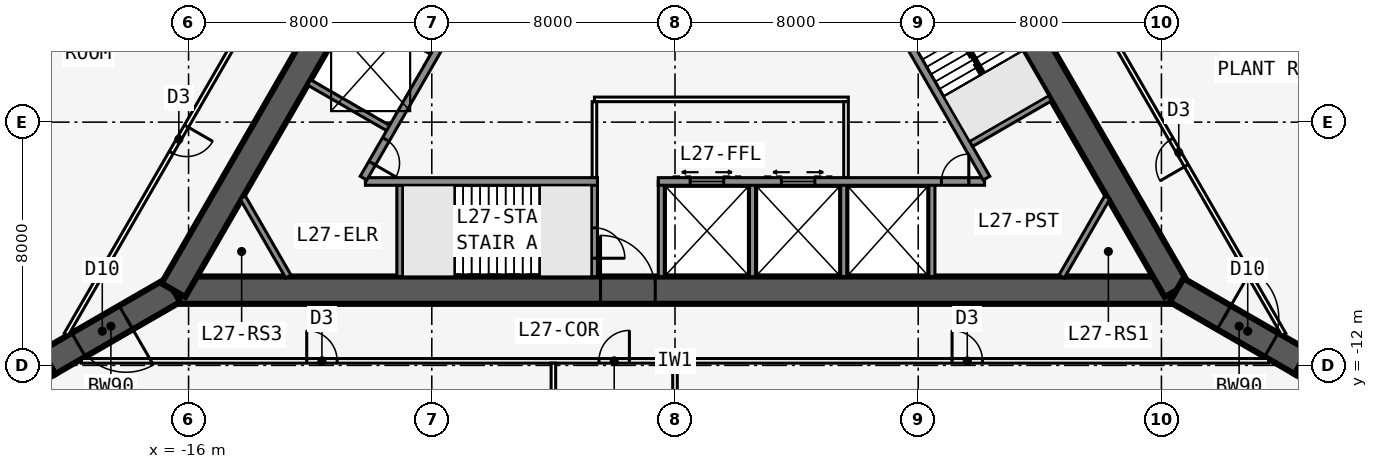
"""IFC4 building model, lengths in metres.
Left out: names, types, materials, properties, quantities, classifications, styles, units other than length and angle.
Written with IfcOpenShell. Run it as: python <this file> out.ifc"""

import sys

from ifc_helpers import new_model, si_unit, direction, frame, frame_2d, origin, place, context, subcontext, project, spatial, rectangle, extrude, element, fill, save


model = new_model("IFC4")
c1 = context("Model", 3, precision=1e-05, world=origin(), true_north=direction((0.0, 1.0)))
c2 = subcontext(c1, "Body", "Model", "MODEL_VIEW")
j1 = project(units=[si_unit("LENGTHUNIT", "METRE"), si_unit("PLANEANGLEUNIT", "RADIAN")], contexts=[c1])
p1 = place(None, origin())
s1 = spatial("IfcSite", under=j1, at=p1, CompositionType="ELEMENT")
p2 = place(p1, origin())
s2 = spatial("IfcBuilding", under=s1, at=p2, CompositionType="ELEMENT")
p3 = place(p2, frame((0.0, 0.0, 103.3)))
s3 = spatial("IfcBuildingStorey", under=s2, at=p3, CompositionType="ELEMENT", Elevation=103.3)
p4 = place(p3, frame((-16.5, -9.526, 0.0), z_axis=(0.0, 0.0, 1.0), x_axis=(1.0, 0.0, 0.0)))
e1 = element("IfcWall", 1, at=p4, inside=s3, PredefinedType="SHEAR", context=c2, shape_type="SweptSolid", body=[
    extrude(rectangle(XDim=33.0, YDim=0.9, at=frame_2d((16.5, 0.0))), origin(), (0.0, 0.0, 1.0), 6.4),
])
p5 = place(p4, frame((14.05, 0.0, 0.0)))
e2 = element("IfcOpeningElement", 2, at=p5, cuts=e1, PredefinedType="OPENING", context=c2, shape_type="SweptSolid", body=[
    extrude(rectangle(XDim=1.8, YDim=2.13, at=frame_2d((0.9, 1.065))), frame((0.0, 0.46, 0.0), z_axis=(0.0, -1.0, 0.0), x_axis=(1.0, 0.0, 0.0)), (0.0, 0.0, 1.0), 0.92),
])
p6 = place(p3, frame((-10.183, -5.951, 0.0), z_axis=(0.0, 0.0, 1.0), x_axis=(1.0, 0.0, 0.0)))
e3 = element("IfcWall", 3, at=p6, inside=s3, PredefinedType="SOLIDWALL", context=c2, shape_type="SweptSolid", body=[
    extrude(rectangle(XDim=7.633, YDim=0.25, at=frame_2d((3.816, 0.0))), origin(), (0.0, 0.0, 1.0), 6.15),
])
p7 = place(p3, frame((-0.55, -5.951, 0.0), z_axis=(0.0, 0.0, 1.0), x_axis=(1.0, 0.0, 0.0)))
e4 = element("IfcWall", 4, at=p7, inside=s3, PredefinedType="SOLIDWALL", context=c2, shape_type="SweptSolid", body=[
    extrude(rectangle(XDim=10.733, YDim=0.25, at=frame_2d((5.366, 0.0))), origin(), (0.0, 0.0, 1.0), 6.15),
])
p8 = place(p7, frame((9.314, 0.0, 0.0)))
e5 = element("IfcOpeningElement", 5, at=p8, cuts=e4, PredefinedType="OPENING", context=c2, shape_type="SweptSolid", body=[
    extrude(rectangle(XDim=0.9, YDim=2.13, at=frame_2d((0.45, 1.065))), frame((0.0, 0.135, 0.0), z_axis=(0.0, -1.0, 0.0), x_axis=(1.0, 0.0, 0.0)), (0.0, 0.0, 1.0), 0.27),
])
p9 = place(p7, frame((1.05, 0.0, 0.0)))
e6 = element("IfcOpeningElement", 6, at=p9, cuts=e4, PredefinedType="OPENING", context=c2, shape_type="SweptSolid", body=[
    extrude(rectangle(XDim=1.1, YDim=2.13, at=frame_2d((0.55, 1.065))), frame((0.0, 0.135, 0.0), z_axis=(0.0, -1.0, 0.0), x_axis=(1.0, 0.0, 0.0)), (0.0, 0.0, 1.0), 0.27),
])
p10 = place(p7, frame((4.05, 0.0, 0.0)))
e7 = element("IfcOpeningElement", 7, at=p10, cuts=e4, PredefinedType="OPENING", context=c2, shape_type="SweptSolid", body=[
    extrude(rectangle(XDim=1.1, YDim=2.13, at=frame_2d((0.55, 1.065))), frame((0.0, 0.135, 0.0), z_axis=(0.0, -1.0, 0.0), x_axis=(1.0, 0.0, 0.0)), (0.0, 0.0, 1.0), 0.27),
])
p11 = place(p3, frame((-9.05, -5.951, 0.0), z_axis=(0.0, 0.0, 1.0), x_axis=(0.0, -1.0, 0.0)))
e8 = element("IfcWall", 8, at=p11, inside=s3, PredefinedType="SOLIDWALL", context=c2, shape_type="SweptSolid", body=[
    extrude(rectangle(XDim=3.125, YDim=0.2, at=frame_2d((1.562, 0.0))), origin(), (0.0, 0.0, 1.0), 6.15),
])
p12 = place(p3, frame((-2.65, -5.951, 0.0), z_axis=(0.0, 0.0, 1.0), x_axis=(0.0, -1.0, 0.0)))
e9 = element("IfcWall", 9, at=p12, inside=s3, PredefinedType="SOLIDWALL", context=c2, shape_type="SweptSolid", body=[
    extrude(rectangle(XDim=3.125, YDim=0.2, at=frame_2d((1.562, 0.0))), origin(), (0.0, 0.0, 1.0), 6.15),
])
p13 = place(p12, frame((1.525, 0.0, 0.0)))
e10 = element("IfcOpeningElement", 10, at=p13, cuts=e9, PredefinedType="OPENING", context=c2, shape_type="SweptSolid", body=[
    extrude(rectangle(XDim=1.0, YDim=2.13, at=frame_2d((0.5, 1.065))), frame((0.0, 0.11, 0.0), z_axis=(0.0, -1.0, 0.0), x_axis=(1.0, 0.0, 0.0)), (0.0, 0.0, 1.0), 0.22),
])
for number, where, z_axis, x_axis in (
    (11, (-0.45, -5.951, 0.0), (0.0, 0.0, 1.0), (0.0, -1.0, 0.0)),
    (12, (2.55, -5.951, 0.0), (0.0, 0.0, 1.0), (0.0, -1.0, 0.0)),
    (13, (5.55, -5.951, 0.0), (0.0, 0.0, 1.0), (0.0, -1.0, 0.0)),
    (14, (8.45, -5.951, 0.0), (0.0, 0.0, 1.0), (0.0, -1.0, 0.0)),
):
    element("IfcWall", number, at=place(p3, frame(where, z_axis=z_axis, x_axis=x_axis)), inside=s3, PredefinedType="SOLIDWALL", context=c2, shape_type="SweptSolid", body=[
        extrude(rectangle(XDim=3.125, YDim=0.2, at=frame_2d((1.562, 0.0))), origin(), (0.0, 0.0, 1.0), 6.15),
    ])
p14 = place(p3, frame((16.5, -9.526, 0.0), z_axis=(0.0, 0.0, 1.0), x_axis=(-0.499999749417, 0.866025548458, 0.0)))
e15 = element("IfcWall", 15, at=p14, inside=s3, PredefinedType="SHEAR", context=c2, shape_type="SweptSolid", body=[
    extrude(rectangle(XDim=33.0, YDim=0.9, at=frame_2d((16.5, 0.0))), origin(), (0.0, 0.0, 1.0), 6.4),
])
p15 = place(p14, frame((14.15, 0.0, 0.0)))
e16 = element("IfcOpeningElement", 16, at=p15, cuts=e15, PredefinedType="OPENING", context=c2, shape_type="SweptSolid", body=[
    extrude(rectangle(XDim=1.8, YDim=2.13, at=frame_2d((0.9, 1.065))), frame((0.0, 0.46, 0.0), z_axis=(0.0, -1.0, 0.0), x_axis=(1.0, 0.0, 0.0)), (0.0, 0.0, 1.0), 0.92),
])
p16 = place(p14, frame((12.6, 0.0, 0.0)))
e17 = element("IfcOpeningElement", 17, at=p16, cuts=e15, PredefinedType="OPENING", context=c2, shape_type="SweptSolid", body=[
    extrude(rectangle(XDim=1.0, YDim=2.13, at=frame_2d((0.5, 1.065))), frame((0.0, 0.46, 0.0), z_axis=(0.0, -1.0, 0.0), x_axis=(1.0, 0.0, 0.0)), (0.0, 0.0, 1.0), 0.92),
])
p17 = place(p3, frame((10.245, -5.843, 0.0), z_axis=(0.0, 0.0, 1.0), x_axis=(-0.499993009313, 0.866029439822, 0.0)))
e18 = element("IfcWall", 18, at=p17, inside=s3, PredefinedType="SOLIDWALL", context=c2, shape_type="SweptSolid", body=[
    extrude(rectangle(XDim=7.733, YDim=0.25, at=frame_2d((3.866, 0.0))), origin(), (0.0, 0.0, 1.0), 6.15),
])
p18 = place(p3, frame((9.629, -4.775, 0.0), z_axis=(0.0, 0.0, 1.0), x_axis=(0.866022959057, 0.500004234368, 0.0)))
e19 = element("IfcWall", 19, at=p18, inside=s3, PredefinedType="SOLIDWALL", context=c2, shape_type="SweptSolid", body=[
    extrude(rectangle(XDim=3.125, YDim=0.2, at=frame_2d((1.562, 0.0))), origin(), (0.0, 0.0, 1.0), 6.15),
])
p19 = place(p3, frame((0.0, 19.052, 0.0), z_axis=(0.0, 0.0, 1.0), x_axis=(-0.499999749417, -0.866025548458, 0.0)))
e20 = element("IfcWall", 20, at=p19, inside=s3, PredefinedType="SHEAR", context=c2, shape_type="SweptSolid", body=[
    extrude(rectangle(XDim=33.0, YDim=0.9, at=frame_2d((16.5, 0.0))), origin(), (0.0, 0.0, 1.0), 6.4),
])
p20 = place(p19, frame((14.15, 0.0, 0.0)))
e21 = element("IfcOpeningElement", 21, at=p20, cuts=e20, PredefinedType="OPENING", context=c2, shape_type="SweptSolid", body=[
    extrude(rectangle(XDim=1.8, YDim=2.13, at=frame_2d((0.9, 1.065))), frame((0.0, 0.46, 0.0), z_axis=(0.0, -1.0, 0.0), x_axis=(1.0, 0.0, 0.0)), (0.0, 0.0, 1.0), 0.92),
])
p21 = place(p19, frame((12.6, 0.0, 0.0)))
e22 = element("IfcOpeningElement", 22, at=p21, cuts=e20, PredefinedType="OPENING", context=c2, shape_type="SweptSolid", body=[
    extrude(rectangle(XDim=1.0, YDim=2.13, at=frame_2d((0.5, 1.065))), frame((0.0, 0.46, 0.0), z_axis=(0.0, -1.0, 0.0), x_axis=(1.0, 0.0, 0.0)), (0.0, 0.0, 1.0), 0.92),
])
p22 = place(p3, frame((-4.929, 3.365, 0.0), z_axis=(0.0, 0.0, 1.0), x_axis=(-0.499991433582, -0.866030349552, 0.0)))
e23 = element("IfcWall", 23, at=p22, inside=s3, PredefinedType="SOLIDWALL", context=c2, shape_type="SweptSolid", body=[
    extrude(rectangle(XDim=10.633, YDim=0.25, at=frame_2d((5.316, 0.0))), origin(), (0.0, 0.0, 1.0), 6.15),
])
p23 = place(p22, frame((9.164, 0.0, 0.0)))
e24 = element("IfcOpeningElement", 24, at=p23, cuts=e23, PredefinedType="OPENING", context=c2, shape_type="SweptSolid", body=[
    extrude(rectangle(XDim=0.9, YDim=2.13, at=frame_2d((0.45, 1.065))), frame((0.0, 0.135, 0.0), z_axis=(0.0, -1.0, 0.0), x_axis=(1.0, 0.0, 0.0)), (0.0, 0.0, 1.0), 0.27),
])
for number, where, z_axis, x_axis in (
    (25, (-7.879, -1.744, 0.0), (0.0, 0.0, 1.0), (-0.866, 0.5, 0.0)),
    (26, (-9.329, -4.256, 0.0), (0.0, 0.0, 1.0), (-0.866, 0.5, 0.0)),
):
    element("IfcWall", number, at=place(p3, frame(where, z_axis=z_axis, x_axis=x_axis)), inside=s3, PredefinedType="SOLIDWALL", context=c2, shape_type="SweptSolid", body=[
        extrude(rectangle(XDim=3.125, YDim=0.2, at=frame_2d((1.562, 0.0))), origin(), (0.0, 0.0, 1.0), 6.15),
    ])
p24 = place(p3, frame((16.5, -9.526, 0.0), z_axis=(0.0, 0.0, 1.0), x_axis=(0.866031398331, -0.499989616998, 0.0)))
e27 = element("IfcWall", 27, at=p24, inside=s3, PredefinedType="SHEAR", context=c2, shape_type="SweptSolid", body=[
    extrude(rectangle(XDim=4.746, YDim=0.9, at=frame_2d((2.373, 0.0))), origin(), (0.0, 0.0, 1.0), 6.4),
])
p25 = place(p24, frame((1.8, 0.0, 0.0)))
e28 = element("IfcOpeningElement", 28, at=p25, cuts=e27, PredefinedType="OPENING", context=c2, shape_type="SweptSolid", body=[
    extrude(rectangle(XDim=1.8, YDim=2.13, at=frame_2d((0.9, 1.065))), frame((0.0, 0.46, 0.0), z_axis=(0.0, -1.0, 0.0), x_axis=(1.0, 0.0, 0.0)), (0.0, 0.0, 1.0), 0.92),
])
p26 = place(p3, frame((20.61, -11.899, 0.0), z_axis=(0.0, 0.0, 1.0), x_axis=(0.866009537788, -0.500027479704, 0.0)))
e29 = element("IfcWall", 29, at=p26, inside=s3, PredefinedType="SHEAR", context=c2, shape_type="SweptSolid", body=[
    extrude(rectangle(XDim=1.155, YDim=0.9, at=frame_2d((0.577, 0.0))), origin(), (0.0, 0.0, 1.0), 6.4),
])
p27 = place(p3, frame((-16.5, -9.526, 0.0), z_axis=(0.0, 0.0, 1.0), x_axis=(-0.866031398331, -0.499989616998, 0.0)))
e30 = element("IfcWall", 30, at=p27, inside=s3, PredefinedType="SHEAR", context=c2, shape_type="SweptSolid", body=[
    extrude(rectangle(XDim=4.746, YDim=0.9, at=frame_2d((2.373, 0.0))), origin(), (0.0, 0.0, 1.0), 6.4),
])
p28 = place(p27, frame((1.8, 0.0, 0.0)))
e31 = element("IfcOpeningElement", 31, at=p28, cuts=e30, PredefinedType="OPENING", context=c2, shape_type="SweptSolid", body=[
    extrude(rectangle(XDim=1.8, YDim=2.13, at=frame_2d((0.9, 1.065))), frame((0.0, 0.46, 0.0), z_axis=(0.0, -1.0, 0.0), x_axis=(1.0, 0.0, 0.0)), (0.0, 0.0, 1.0), 0.92),
])
p29 = place(p3, frame((-20.61, -11.899, 0.0), z_axis=(0.0, 0.0, 1.0), x_axis=(-0.866009537788, -0.500027479704, 0.0)))
e32 = element("IfcWall", 32, at=p29, inside=s3, PredefinedType="SHEAR", context=c2, shape_type="SweptSolid", body=[
    extrude(rectangle(XDim=1.155, YDim=0.9, at=frame_2d((0.577, 0.0))), origin(), (0.0, 0.0, 1.0), 6.4),
])
p30 = place(p3, frame((-19.527, -11.851, 0.0), z_axis=(0.0, 0.0, 1.0), x_axis=(1.0, 0.0, 0.0)))
e33 = element("IfcWall", 33, at=p30, inside=s3, PredefinedType="PARTITIONING", context=c2, shape_type="SweptSolid", body=[
    extrude(rectangle(XDim=39.054, YDim=0.15, at=frame_2d((19.527, 0.0))), origin(), (0.0, 0.0, 1.0), 6.15),
])
p31 = place(p30, frame((7.414, 0.0, 0.0)))
e34 = element("IfcOpeningElement", 34, at=p31, cuts=e33, PredefinedType="OPENING", context=c2, shape_type="SweptSolid", body=[
    extrude(rectangle(XDim=1.0, YDim=2.13, at=frame_2d((0.5, 1.065))), frame((0.0, 0.085, 0.0), z_axis=(0.0, -1.0, 0.0), x_axis=(1.0, 0.0, 0.0)), (0.0, 0.0, 1.0), 0.17),
])
p32 = place(p30, frame((17.027, 0.0, 0.0)))
e35 = element("IfcOpeningElement", 35, at=p32, cuts=e33, PredefinedType="OPENING", context=c2, shape_type="SweptSolid", body=[
    extrude(rectangle(XDim=1.0, YDim=2.13, at=frame_2d((0.5, 1.065))), frame((0.0, 0.085, 0.0), z_axis=(0.0, -1.0, 0.0), x_axis=(1.0, 0.0, 0.0)), (0.0, 0.0, 1.0), 0.17),
])
p33 = place(p30, frame((28.64, 0.0, 0.0)))
e36 = element("IfcOpeningElement", 36, at=p33, cuts=e33, PredefinedType="OPENING", context=c2, shape_type="SweptSolid", body=[
    extrude(rectangle(XDim=1.0, YDim=2.13, at=frame_2d((0.5, 1.065))), frame((0.0, 0.085, 0.0), z_axis=(0.0, -1.0, 0.0), x_axis=(1.0, 0.0, 0.0)), (0.0, 0.0, 1.0), 0.17),
])
p34 = place(p3, frame((-4.0, -11.926, 0.0), z_axis=(0.0, 0.0, 1.0), x_axis=(0.0, -1.0, 0.0)))
e37 = element("IfcWall", 37, at=p34, inside=s3, PredefinedType="PARTITIONING", context=c2, shape_type="SweptSolid", body=[
    extrude(rectangle(XDim=9.974, YDim=0.15, at=frame_2d((4.987, 0.0))), origin(), (0.0, 0.0, 1.0), 6.15),
])
p35 = place(p3, frame((0.0, -11.926, 0.0), z_axis=(0.0, 0.0, 1.0), x_axis=(0.0, -1.0, 0.0)))
e38 = element("IfcWall", 38, at=p35, inside=s3, PredefinedType="PARTITIONING", context=c2, shape_type="SweptSolid", body=[
    extrude(rectangle(XDim=10.096, YDim=0.15, at=frame_2d((5.048, 0.0))), origin(), (0.0, 0.0, 1.0), 5.109),
])
p36 = place(p3, frame((20.027, -10.985, 0.0), z_axis=(0.0, 0.0, 1.0), x_axis=(-0.500001677587, 0.866024435227, 0.0)))
e39 = element("IfcWall", 39, at=p36, inside=s3, PredefinedType="PARTITIONING", context=c2, shape_type="SweptSolid", body=[
    extrude(rectangle(XDim=39.054, YDim=0.15, at=frame_2d((19.527, 0.0))), origin(), (0.0, 0.0, 1.0), 6.15),
])
p37 = place(p36, frame((6.414, 0.0, 0.0)))
e40 = element("IfcOpeningElement", 40, at=p37, cuts=e39, PredefinedType="OPENING", context=c2, shape_type="SweptSolid", body=[
    extrude(rectangle(XDim=1.0, YDim=2.13, at=frame_2d((0.5, 1.065))), frame((0.0, 0.085, 0.0), z_axis=(0.0, -1.0, 0.0), x_axis=(1.0, 0.0, 0.0)), (0.0, 0.0, 1.0), 0.17),
])
p38 = place(p36, frame((17.527, 0.0, 0.0)))
e41 = element("IfcOpeningElement", 41, at=p38, cuts=e39, PredefinedType="OPENING", context=c2, shape_type="SweptSolid", body=[
    extrude(rectangle(XDim=1.0, YDim=2.13, at=frame_2d((0.5, 1.065))), frame((0.0, 0.085, 0.0), z_axis=(0.0, -1.0, 0.0), x_axis=(1.0, 0.0, 0.0)), (0.0, 0.0, 1.0), 0.17),
])
p39 = place(p36, frame((30.14, 0.0, 0.0)))
e42 = element("IfcOpeningElement", 42, at=p39, cuts=e39, PredefinedType="OPENING", context=c2, shape_type="SweptSolid", body=[
    extrude(rectangle(XDim=1.0, YDim=2.13, at=frame_2d((0.5, 1.065))), frame((0.0, 0.085, 0.0), z_axis=(0.0, -1.0, 0.0), x_axis=(1.0, 0.0, 0.0)), (0.0, 0.0, 1.0), 0.17),
])
p40 = place(p3, frame((-0.5, 22.836, 0.0), z_axis=(0.0, 0.0, 1.0), x_axis=(-0.500001677587, -0.866024435227, 0.0)))
e43 = element("IfcWall", 43, at=p40, inside=s3, PredefinedType="PARTITIONING", context=c2, shape_type="SweptSolid", body=[
    extrude(rectangle(XDim=39.054, YDim=0.15, at=frame_2d((19.527, 0.0))), origin(), (0.0, 0.0, 1.0), 6.15),
])
p41 = place(p40, frame((9.414, 0.0, 0.0)))
e44 = element("IfcOpeningElement", 44, at=p41, cuts=e43, PredefinedType="OPENING", context=c2, shape_type="SweptSolid", body=[
    extrude(rectangle(XDim=1.0, YDim=2.13, at=frame_2d((0.5, 1.065))), frame((0.0, 0.085, 0.0), z_axis=(0.0, -1.0, 0.0), x_axis=(1.0, 0.0, 0.0)), (0.0, 0.0, 1.0), 0.17),
])
p42 = place(p40, frame((21.527, 0.0, 0.0)))
e45 = element("IfcOpeningElement", 45, at=p42, cuts=e43, PredefinedType="OPENING", context=c2, shape_type="SweptSolid", body=[
    extrude(rectangle(XDim=1.0, YDim=2.13, at=frame_2d((0.5, 1.065))), frame((0.0, 0.085, 0.0), z_axis=(0.0, -1.0, 0.0), x_axis=(1.0, 0.0, 0.0)), (0.0, 0.0, 1.0), 0.17),
])
p43 = place(p40, frame((31.14, 0.0, 0.0)))
e46 = element("IfcOpeningElement", 46, at=p43, cuts=e43, PredefinedType="OPENING", context=c2, shape_type="SweptSolid", body=[
    extrude(rectangle(XDim=1.0, YDim=2.13, at=frame_2d((0.5, 1.065))), frame((0.0, 0.085, 0.0), z_axis=(0.0, -1.0, 0.0), x_axis=(1.0, 0.0, 0.0)), (0.0, 0.0, 1.0), 0.17),
])
p44 = place(p3, frame((-2.65, -3.251, 0.0), z_axis=(0.0, 0.0, 1.0), x_axis=(1.0, 0.0, 0.0)))
e47 = element("IfcWall", 47, at=p44, inside=s3, PredefinedType="PARTITIONING", context=c2, shape_type="SweptSolid", body=[
    extrude(rectangle(XDim=8.35, YDim=0.15, at=frame_2d((4.175, 0.0))), origin(), (0.0, 0.0, 1.0), 6.15),
])
for number, where, z_axis, x_axis in (
    (48, (-2.65, -5.826, 0.0), (0.0, 0.0, 1.0), (0.0, 1.0, 0.0)),
    (49, (5.625, -5.826, 0.0), (0.0, 0.0, 1.0), (0.0, 1.0, 0.0)),
):
    element("IfcWall", number, at=place(p3, frame(where, z_axis=z_axis, x_axis=x_axis)), inside=s3, PredefinedType="PARTITIONING", context=c2, shape_type="SweptSolid", body=[
        extrude(rectangle(XDim=2.5, YDim=0.15, at=frame_2d((1.25, 0.0))), origin(), (0.0, 0.0, 1.0), 6.15),
    ])
for number, where, z_axis, x_axis in (
    (50, (14.219, -6.476, 0.0), (0.0, 0.0, 1.0), (-0.5, -0.866, 0.0)),
    (51, (-12.719, -9.076, 0.0), (0.0, 0.0, 1.0), (-0.5, 0.866, 0.0)),
):
    element("IfcWall", number, at=place(p3, frame(where, z_axis=z_axis, x_axis=x_axis)), inside=s3, PredefinedType="SOLIDWALL", context=c2, shape_type="SweptSolid", body=[
        extrude(rectangle(XDim=3.002, YDim=0.2, at=frame_2d((1.501, 0.0))), origin(), (0.0, 0.0, 1.0), 6.15),
    ])
p45 = place(p3, frame((-7.247, -7.576, 0.0), z_axis=(0.0, 0.0, 1.0), x_axis=(1.0, 0.0, 0.0)))
e52 = element("IfcWall", 52, at=p45, inside=s3, PredefinedType="SOLIDWALL", context=c2, shape_type="SweptSolid", body=[
    extrude(rectangle(XDim=2.794, YDim=0.1, at=frame_2d((1.397, 0.0))), origin(), (0.0, 0.0, 1.0), 6.4),
])
p46 = place(p3, frame((10.135, -2.401, 0.0), z_axis=(0.0, 0.0, 1.0), x_axis=(-0.499992232847, 0.866029888106, 0.0)))
e53 = element("IfcWall", 53, at=p46, inside=s3, PredefinedType="SOLIDWALL", context=c2, shape_type="SweptSolid", body=[
    extrude(rectangle(XDim=2.794, YDim=0.1, at=frame_2d((1.397, 0.0))), origin(), (0.0, 0.0, 1.0), 6.4),
])
p47 = place(p31, origin())
e54 = element("IfcDoor", 54, at=p47, inside=s3, OperationType="SINGLE_SWING_LEFT", PredefinedType="DOOR", context=c2, shape_type="SweptSolid", body=[
    extrude(rectangle(XDim=1.0, YDim=2.13, at=frame_2d((0.5, 1.065))), frame((0.0, 0.025, 0.0), z_axis=(0.0, -1.0, 0.0), x_axis=(1.0, 0.0, 0.0)), (0.0, 0.0, 1.0), 0.05),
])
fill(e34, e54)
p48 = place(p32, origin())
e55 = element("IfcDoor", 55, at=p48, inside=s3, OperationType="SINGLE_SWING_RIGHT", PredefinedType="DOOR", context=c2, shape_type="SweptSolid", body=[
    extrude(rectangle(XDim=1.0, YDim=2.13, at=frame_2d((0.5, 1.065))), frame((0.0, 0.025, 0.0), z_axis=(0.0, -1.0, 0.0), x_axis=(1.0, 0.0, 0.0)), (0.0, 0.0, 1.0), 0.05),
])
fill(e35, e55)
p49 = place(p33, origin())
e56 = element("IfcDoor", 56, at=p49, inside=s3, OperationType="SINGLE_SWING_LEFT", PredefinedType="DOOR", context=c2, shape_type="SweptSolid", body=[
    extrude(rectangle(XDim=1.0, YDim=2.13, at=frame_2d((0.5, 1.065))), frame((0.0, 0.025, 0.0), z_axis=(0.0, -1.0, 0.0), x_axis=(1.0, 0.0, 0.0)), (0.0, 0.0, 1.0), 0.05),
])
fill(e36, e56)
p50 = place(p37, origin())
e57 = element("IfcDoor", 57, at=p50, inside=s3, OperationType="SINGLE_SWING_LEFT", PredefinedType="DOOR", context=c2, shape_type="SweptSolid", body=[
    extrude(rectangle(XDim=1.0, YDim=2.13, at=frame_2d((0.5, 1.065))), frame((0.0, 0.025, 0.0), z_axis=(0.0, -1.0, 0.0), x_axis=(1.0, 0.0, 0.0)), (0.0, 0.0, 1.0), 0.05),
])
fill(e40, e57)
p51 = place(p43, origin())
e58 = element("IfcDoor", 58, at=p51, inside=s3, OperationType="SINGLE_SWING_LEFT", PredefinedType="DOOR", context=c2, shape_type="SweptSolid", body=[
    extrude(rectangle(XDim=1.0, YDim=2.13, at=frame_2d((0.5, 1.065))), frame((0.0, 0.025, 0.0), z_axis=(0.0, -1.0, 0.0), x_axis=(1.0, 0.0, 0.0)), (0.0, 0.0, 1.0), 0.05),
])
fill(e46, e58)
p52 = place(p5, origin())
e59 = element("IfcDoor", 59, at=p52, inside=s3, OperationType="DOUBLE_DOOR_SINGLE_SWING", PredefinedType="DOOR", context=c2, shape_type="SweptSolid", body=[
    extrude(rectangle(XDim=1.8, YDim=2.13, at=frame_2d((0.9, 1.065))), frame((0.0, 0.025, 0.0), z_axis=(0.0, -1.0, 0.0), x_axis=(1.0, 0.0, 0.0)), (0.0, 0.0, 1.0), 0.05),
])
fill(e2, e59)
p53 = place(p13, origin())
e60 = element("IfcDoor", 60, at=p53, inside=s3, OperationType="SINGLE_SWING_RIGHT", PredefinedType="DOOR", context=c2, shape_type="SweptSolid", body=[
    extrude(rectangle(XDim=1.0, YDim=2.13, at=frame_2d((0.5, 1.065))), frame((0.0, 0.025, 0.0), z_axis=(0.0, -1.0, 0.0), x_axis=(1.0, 0.0, 0.0)), (0.0, 0.0, 1.0), 0.05),
])
fill(e10, e60)
p54 = place(p25, origin())
e61 = element("IfcDoor", 61, at=p54, inside=s3, OperationType="DOUBLE_DOOR_DOUBLE_SWING", PredefinedType="DOOR", context=c2, shape_type="SweptSolid", body=[
    extrude(rectangle(XDim=1.8, YDim=2.13, at=frame_2d((0.9, 1.065))), frame((0.0, 0.025, 0.0), z_axis=(0.0, -1.0, 0.0), x_axis=(1.0, 0.0, 0.0)), (0.0, 0.0, 1.0), 0.05),
])
fill(e28, e61)
p55 = place(p28, origin())
e62 = element("IfcDoor", 62, at=p55, inside=s3, OperationType="DOUBLE_DOOR_DOUBLE_SWING", PredefinedType="DOOR", context=c2, shape_type="SweptSolid", body=[
    extrude(rectangle(XDim=1.8, YDim=2.13, at=frame_2d((0.9, 1.065))), frame((0.0, 0.025, 0.0), z_axis=(0.0, -1.0, 0.0), x_axis=(1.0, 0.0, 0.0)), (0.0, 0.0, 1.0), 0.05),
])
fill(e31, e62)
p56 = place(p8, origin())
e63 = element("IfcDoor", 63, at=p56, inside=s3, OperationType="SINGLE_SWING_RIGHT", PredefinedType="DOOR", context=c2, shape_type="SweptSolid", body=[
    extrude(rectangle(XDim=0.9, YDim=2.13, at=frame_2d((0.45, 1.065))), frame((0.0, 0.025, 0.0), z_axis=(0.0, -1.0, 0.0), x_axis=(1.0, 0.0, 0.0)), (0.0, 0.0, 1.0), 0.05),
])
fill(e5, e63)
p57 = place(p23, origin())
e64 = element("IfcDoor", 64, at=p57, inside=s3, OperationType="SINGLE_SWING_RIGHT", PredefinedType="DOOR", context=c2, shape_type="SweptSolid", body=[
    extrude(rectangle(XDim=0.9, YDim=2.13, at=frame_2d((0.45, 1.065))), frame((0.0, 0.025, 0.0), z_axis=(0.0, -1.0, 0.0), x_axis=(1.0, 0.0, 0.0)), (0.0, 0.0, 1.0), 0.05),
])
fill(e24, e64)
p58 = place(p9, origin())
e65 = element("IfcDoor", 65, at=p58, inside=s3, OperationType="DOUBLE_DOOR_SLIDING", PredefinedType="USERDEFINED", context=c2, shape_type="SweptSolid", body=[
    extrude(rectangle(XDim=1.1, YDim=2.13, at=frame_2d((0.55, 1.065))), frame((0.0, 0.025, 0.0), z_axis=(0.0, -1.0, 0.0), x_axis=(1.0, 0.0, 0.0)), (0.0, 0.0, 1.0), 0.05),
])
fill(e6, e65)
p59 = place(p10, origin())
e66 = element("IfcDoor", 66, at=p59, inside=s3, OperationType="DOUBLE_DOOR_SLIDING", PredefinedType="USERDEFINED", context=c2, shape_type="SweptSolid", body=[
    extrude(rectangle(XDim=1.1, YDim=2.13, at=frame_2d((0.55, 1.065))), frame((0.0, 0.025, 0.0), z_axis=(0.0, -1.0, 0.0), x_axis=(1.0, 0.0, 0.0)), (0.0, 0.0, 1.0), 0.05),
])
fill(e7, e66)
save(model, sys.argv[1])
